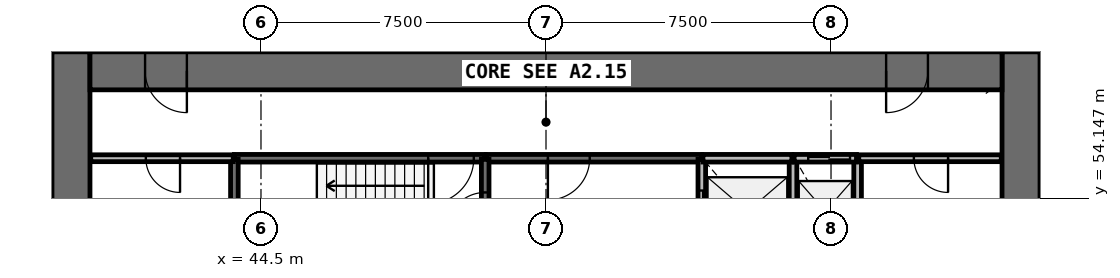
"""IFC4 building model, lengths in metres.
Left out: names, types, materials, properties, quantities, classifications, styles, units other than length and angle.
Written with IfcOpenShell. Run it as: python <this file> out.ifc"""

import sys

from ifc_helpers import new_model, si_unit, direction, frame, frame_2d, origin, place, context, subcontext, project, spatial, rectangle, extrude, source, transform, mapped, element, fill, save


model = new_model("IFC4")
c1 = context("Model", 3, precision=1e-05, world=origin(), true_north=direction((0.0, 1.0)))
c2 = subcontext(c1, "Body", "Model", "MODEL_VIEW")
j1 = project(units=[si_unit("LENGTHUNIT", "METRE"), si_unit("PLANEANGLEUNIT", "RADIAN")], contexts=[c1])
p1 = place(None, origin())
s1 = spatial("IfcSite", under=j1, at=p1, CompositionType="ELEMENT")
p2 = place(p1, origin())
s2 = spatial("IfcBuilding", under=s1, at=p2, CompositionType="ELEMENT")
p3 = place(p2, frame((0.0, 0.0, 62.2)))
s3 = spatial("IfcBuildingStorey", under=s2, at=p3, CompositionType="ELEMENT", Elevation=62.2)
p4 = place(p3, frame((64.5, 38.0, 0.0), z_axis=(0.0, 0.0, 1.0), x_axis=(0.0, 1.0, 0.0)))
e1 = element("IfcWall", 1, at=p4, inside=s3, PredefinedType="SHEAR", context=c2, shape_type="SweptSolid", body=[
    extrude(rectangle(XDim=20.0, YDim=1.0, at=frame_2d((10.0, 0.0))), origin(), (0.0, 0.0, 1.0), 4.4),
])
p5 = place(p4, frame((9.1, 0.0, 0.0)))
e2 = element("IfcOpeningElement", 2, at=p5, cuts=e1, PredefinedType="OPENING", context=c2, shape_type="SweptSolid", body=[
    extrude(rectangle(XDim=1.8, YDim=2.1, at=frame_2d((0.9, 1.05))), frame((0.0, 0.51, 0.0), z_axis=(0.0, -1.0, 0.0), x_axis=(1.0, 0.0, 0.0)), (0.0, 0.0, 1.0), 1.02),
])
p6 = place(p3, frame((39.5, 58.0, 0.0), z_axis=(0.0, 0.0, 1.0), x_axis=(0.0, -1.0, 0.0)))
e3 = element("IfcWall", 3, at=p6, inside=s3, PredefinedType="SHEAR", context=c2, shape_type="SweptSolid", body=[
    extrude(rectangle(XDim=20.0, YDim=1.0, at=frame_2d((10.0, 0.0))), origin(), (0.0, 0.0, 1.0), 4.4),
])
p7 = place(p6, frame((9.1, 0.0, 0.0)))
e4 = element("IfcOpeningElement", 4, at=p7, cuts=e3, PredefinedType="OPENING", context=c2, shape_type="SweptSolid", body=[
    extrude(rectangle(XDim=1.8, YDim=2.1, at=frame_2d((0.9, 1.05))), frame((0.0, 0.51, 0.0), z_axis=(0.0, -1.0, 0.0), x_axis=(1.0, 0.0, 0.0)), (0.0, 0.0, 1.0), 1.02),
])
p8 = place(p3, frame((64.0, 57.5, 0.0), z_axis=(0.0, 0.0, 1.0), x_axis=(-1.0, 0.0, 0.0)))
e5 = element("IfcWall", 5, at=p8, inside=s3, PredefinedType="SHEAR", context=c2, shape_type="SweptSolid", body=[
    extrude(rectangle(XDim=24.0, YDim=1.0, at=frame_2d((12.0, 0.0))), origin(), (0.0, 0.0, 1.0), 4.4),
])
p9 = place(p8, frame((21.45, 0.0, 0.0)))
e6 = element("IfcOpeningElement", 6, at=p9, cuts=e5, PredefinedType="OPENING", context=c2, shape_type="SweptSolid", body=[
    extrude(rectangle(XDim=1.1, YDim=2.1, at=frame_2d((0.55, 1.05))), frame((0.0, 0.51, 0.0), z_axis=(0.0, -1.0, 0.0), x_axis=(1.0, 0.0, 0.0)), (0.0, 0.0, 1.0), 1.02),
])
p10 = place(p8, frame((1.95, 0.0, 0.0)))
e7 = element("IfcOpeningElement", 7, at=p10, cuts=e5, PredefinedType="OPENING", context=c2, shape_type="SweptSolid", body=[
    extrude(rectangle(XDim=1.1, YDim=2.1, at=frame_2d((0.55, 1.05))), frame((0.0, 0.51, 0.0), z_axis=(0.0, -1.0, 0.0), x_axis=(1.0, 0.0, 0.0)), (0.0, 0.0, 1.0), 1.02),
])
p11 = place(p3, frame((50.4, 55.2, 0.0), z_axis=(0.0, 0.0, 1.0), x_axis=(-1.0, 0.0, 0.0)))
e8 = element("IfcWall", 8, at=p11, inside=s3, PredefinedType="SOLIDWALL", context=c2, shape_type="SweptSolid", body=[
    extrude(rectangle(XDim=6.6, YDim=0.2, at=frame_2d((3.3, 0.0))), origin(), (0.0, 0.0, 1.0), 3.95),
])
p12 = place(p11, frame((0.3, 0.0, 0.0)))
e9 = element("IfcOpeningElement", 9, at=p12, cuts=e8, PredefinedType="OPENING", context=c2, shape_type="SweptSolid", body=[
    extrude(rectangle(XDim=1.2, YDim=2.1, at=frame_2d((0.6, 1.05))), frame((0.0, 0.11, 0.0), z_axis=(0.0, -1.0, 0.0), x_axis=(1.0, 0.0, 0.0)), (0.0, 0.0, 1.0), 0.22),
])
p13 = place(p3, frame((56.1, 55.2, 0.0), z_axis=(0.0, 0.0, 1.0), x_axis=(-1.0, 0.0, 0.0)))
e10 = element("IfcWall", 10, at=p13, inside=s3, PredefinedType="SOLIDWALL", context=c2, shape_type="SweptSolid", body=[
    extrude(rectangle(XDim=5.67, YDim=0.2, at=frame_2d((2.835, 0.0))), origin(), (0.0, 0.0, 1.0), 3.95),
])
p14 = place(p13, frame((2.95, 0.0, 0.0)))
e11 = element("IfcOpeningElement", 11, at=p14, cuts=e10, PredefinedType="OPENING", context=c2, shape_type="SweptSolid", body=[
    extrude(rectangle(XDim=1.1, YDim=2.1, at=frame_2d((0.55, 1.05))), frame((0.0, 0.11, 0.0), z_axis=(0.0, -1.0, 0.0), x_axis=(1.0, 0.0, 0.0)), (0.0, 0.0, 1.0), 0.22),
])
p15 = place(p3, frame((50.4, 52.4, 0.0), z_axis=(0.0, 0.0, 1.0), x_axis=(0.0, 1.0, 0.0)))
e12 = element("IfcWall", 12, at=p15, inside=s3, PredefinedType="SOLIDWALL", context=c2, shape_type="SweptSolid", body=[
    extrude(rectangle(XDim=2.77, YDim=0.2, at=frame_2d((1.385, 0.0))), origin(), (0.0, 0.0, 1.0), 3.95),
])
p16 = place(p15, frame((0.9, 0.0, 0.0)))
e13 = element("IfcOpeningElement", 13, at=p16, cuts=e12, PredefinedType="OPENING", context=c2, shape_type="SweptSolid", body=[
    extrude(rectangle(XDim=1.0, YDim=2.1, at=frame_2d((0.5, 1.05))), frame((0.0, 0.11, 0.0), z_axis=(0.0, -1.0, 0.0), x_axis=(1.0, 0.0, 0.0)), (0.0, 0.0, 1.0), 0.22),
])
p17 = place(p3, frame((56.1, 55.17, 0.0), z_axis=(0.0, 0.0, 1.0), x_axis=(0.0, -1.0, 0.0)))
e14 = element("IfcWall", 14, at=p17, inside=s3, PredefinedType="SOLIDWALL", context=c2, shape_type="SweptSolid", body=[
    extrude(rectangle(XDim=2.77, YDim=0.2, at=frame_2d((1.385, 0.0))), origin(), (0.0, 0.0, 1.0), 3.95),
])
p18 = place(p17, frame((0.82, 0.0, 0.0)))
e15 = element("IfcOpeningElement", 15, at=p18, cuts=e14, PredefinedType="OPENING", context=c2, shape_type="SweptSolid", body=[
    extrude(rectangle(XDim=1.1, YDim=2.1, at=frame_2d((0.55, 1.05))), frame((0.0, 0.11, 0.0), z_axis=(0.0, -1.0, 0.0), x_axis=(1.0, 0.0, 0.0)), (0.0, 0.0, 1.0), 0.22),
])
for number, where, z_axis, x_axis in (
    (16, (58.5, 52.4, 0.0), (0.0, 0.0, 1.0), (0.0, 1.0, 0.0)),
    (17, (60.2, 52.4, 0.0), (0.0, 0.0, 1.0), (0.0, 1.0, 0.0)),
):
    element("IfcWall", number, at=place(p3, frame(where, z_axis=z_axis, x_axis=x_axis)), inside=s3, PredefinedType="SOLIDWALL", context=c2, shape_type="SweptSolid", body=[
        extrude(rectangle(XDim=2.8, YDim=0.2, at=frame_2d((1.4, 0.0))), origin(), (0.0, 0.0, 1.0), 3.95),
    ])
p19 = place(p3, frame((58.47, 55.2, 0.0), z_axis=(0.0, 0.0, 1.0), x_axis=(-1.0, 0.0, 0.0)))
e18 = element("IfcWall", 18, at=p19, inside=s3, PredefinedType="SOLIDWALL", context=c2, shape_type="SweptSolid", body=[
    extrude(rectangle(XDim=2.34, YDim=0.2, at=frame_2d((1.17, 0.0))), origin(), (0.0, 0.0, 1.0), 3.95),
])
p20 = place(p3, frame((43.8, 55.17, 0.0), z_axis=(0.0, 0.0, 1.0), x_axis=(0.0, -1.0, 0.0)))
e19 = element("IfcWall", 19, at=p20, inside=s3, PredefinedType="SOLIDWALL", context=c2, shape_type="SweptSolid", body=[
    extrude(rectangle(XDim=2.14, YDim=0.2, at=frame_2d((1.07, 0.0))), origin(), (0.0, 0.0, 1.0), 3.95),
])
p21 = place(p3, frame((60.17, 55.2, 0.0), z_axis=(0.0, 0.0, 1.0), x_axis=(-1.0, 0.0, 0.0)))
e20 = element("IfcWall", 20, at=p21, inside=s3, PredefinedType="SOLIDWALL", context=c2, shape_type="SweptSolid", body=[
    extrude(rectangle(XDim=1.64, YDim=0.2, at=frame_2d((0.82, 0.0))), origin(), (0.0, 0.0, 1.0), 3.95),
])
p22 = place(p21, frame((0.17, 0.0, 0.0)))
e21 = element("IfcOpeningElement", 21, at=p22, cuts=e20, PredefinedType="OPENING", context=c2, shape_type="SweptSolid", body=[
    extrude(rectangle(XDim=1.1, YDim=2.1, at=frame_2d((0.55, 1.05))), frame((0.0, 0.11, 0.0), z_axis=(0.0, -1.0, 0.0), x_axis=(1.0, 0.0, 0.0)), (0.0, 0.0, 1.0), 0.22),
])
p23 = place(p3, frame((43.77, 55.2, 0.0), z_axis=(0.0, 0.0, 1.0), x_axis=(-1.0, 0.0, 0.0)))
e22 = element("IfcWall", 22, at=p23, inside=s3, PredefinedType="PARTITIONING", context=c2, shape_type="SweptSolid", body=[
    extrude(rectangle(XDim=3.75, YDim=0.18, at=frame_2d((1.875, 0.0))), origin(), (0.0, 0.0, 1.0), 3.95),
])
p24 = place(p23, frame((1.4, 0.0, 0.0)))
e23 = element("IfcOpeningElement", 23, at=p24, cuts=e22, PredefinedType="OPENING", context=c2, shape_type="SweptSolid", body=[
    extrude(rectangle(XDim=0.9, YDim=2.1, at=frame_2d((0.45, 1.05))), frame((0.0, 0.1, 0.0), z_axis=(0.0, -1.0, 0.0), x_axis=(1.0, 0.0, 0.0)), (0.0, 0.0, 1.0), 0.2),
])
p25 = place(p3, frame((63.98, 55.2, 0.0), z_axis=(0.0, 0.0, 1.0), x_axis=(-1.0, 0.0, 0.0)))
e24 = element("IfcWall", 24, at=p25, inside=s3, PredefinedType="PARTITIONING", context=c2, shape_type="SweptSolid", body=[
    extrude(rectangle(XDim=3.75, YDim=0.18, at=frame_2d((1.875, 0.0))), origin(), (0.0, 0.0, 1.0), 3.95),
])
p26 = place(p25, frame((1.4, 0.0, 0.0)))
e25 = element("IfcOpeningElement", 25, at=p26, cuts=e24, PredefinedType="OPENING", context=c2, shape_type="SweptSolid", body=[
    extrude(rectangle(XDim=0.9, YDim=2.1, at=frame_2d((0.45, 1.05))), frame((0.0, 0.1, 0.0), z_axis=(0.0, -1.0, 0.0), x_axis=(1.0, 0.0, 0.0)), (0.0, 0.0, 1.0), 0.2),
])
m1 = source(origin(), c2, "Body", "SweptSolid", [
    extrude(rectangle(XDim=1.1, YDim=2.1, at=frame_2d((0.55, 1.05))), frame((0.0, 0.025, 0.0), z_axis=(0.0, -1.0, 0.0), x_axis=(1.0, 0.0, 0.0)), (0.0, 0.0, 1.0), 0.05),
])
p27 = place(p18, origin())
e26 = element("IfcDoor", 26, at=p27, inside=s3, OperationType="DOUBLE_DOOR_SLIDING", PredefinedType="USERDEFINED", context=c2, shape_type="MappedRepresentation", body=[
    mapped(m1, transform((0.0, 0.0, 0.0), scale=1.0)),
])
fill(e15, e26)
p28 = place(p22, origin())
e27 = element("IfcDoor", 27, at=p28, inside=s3, OperationType="DOUBLE_DOOR_SLIDING", PredefinedType="USERDEFINED", context=c2, shape_type="MappedRepresentation", body=[
    mapped(m1, transform((0.0, 0.0, 0.0), scale=1.0)),
])
fill(e21, e27)
m2 = source(origin(), c2, "Body", "SweptSolid", [
    extrude(rectangle(XDim=1.2, YDim=2.1, at=frame_2d((0.6, 1.05))), frame((0.0, 0.025, 0.0), z_axis=(0.0, -1.0, 0.0), x_axis=(1.0, 0.0, 0.0)), (0.0, 0.0, 1.0), 0.05),
])
p29 = place(p12, origin())
e28 = element("IfcDoor", 28, at=p29, inside=s3, OperationType="SINGLE_SWING_RIGHT", PredefinedType="DOOR", context=c2, shape_type="MappedRepresentation", body=[
    mapped(m2, transform((0.0, 0.0, 0.0), scale=1.0)),
])
fill(e9, e28)
m3 = source(origin(), c2, "Body", "SweptSolid", [
    extrude(rectangle(XDim=1.0, YDim=2.1, at=frame_2d((0.5, 1.05))), frame((0.0, 0.025, 0.0), z_axis=(0.0, -1.0, 0.0), x_axis=(1.0, 0.0, 0.0)), (0.0, 0.0, 1.0), 0.05),
])
p30 = place(p16, origin())
e29 = element("IfcDoor", 29, at=p30, inside=s3, OperationType="SINGLE_SWING_LEFT", PredefinedType="DOOR", context=c2, shape_type="MappedRepresentation", body=[
    mapped(m3, transform((0.0, 0.0, 0.0), scale=1.0)),
])
fill(e13, e29)
m4 = source(origin(), c2, "Body", "SweptSolid", [
    extrude(rectangle(XDim=1.1, YDim=2.1, at=frame_2d((0.55, 1.05))), frame((0.0, 0.025, 0.0), z_axis=(0.0, -1.0, 0.0), x_axis=(1.0, 0.0, 0.0)), (0.0, 0.0, 1.0), 0.05),
])
p31 = place(p14, origin())
e30 = element("IfcDoor", 30, at=p31, inside=s3, OperationType="SINGLE_SWING_RIGHT", PredefinedType="DOOR", context=c2, shape_type="MappedRepresentation", body=[
    mapped(m4, transform((0.0, 0.0, 0.0), scale=1.0)),
])
fill(e11, e30)
m5 = source(origin(), c2, "Body", "SweptSolid", [
    extrude(rectangle(XDim=1.1, YDim=2.1, at=frame_2d((0.55, 1.05))), frame((0.0, 0.025, 0.0), z_axis=(0.0, -1.0, 0.0), x_axis=(1.0, 0.0, 0.0)), (0.0, 0.0, 1.0), 0.05),
])
p32 = place(p9, origin())
e31 = element("IfcDoor", 31, at=p32, inside=s3, OperationType="SINGLE_SWING_LEFT", PredefinedType="DOOR", context=c2, shape_type="MappedRepresentation", body=[
    mapped(m5, transform((0.0, 0.0, 0.0), scale=1.0)),
])
fill(e6, e31)
p33 = place(p10, origin())
e32 = element("IfcDoor", 32, at=p33, inside=s3, OperationType="SINGLE_SWING_RIGHT", PredefinedType="DOOR", context=c2, shape_type="MappedRepresentation", body=[
    mapped(m5, transform((0.0, 0.0, 0.0), scale=1.0)),
])
fill(e7, e32)
m6 = source(origin(), c2, "Body", "SweptSolid", [
    extrude(rectangle(XDim=0.9, YDim=2.1, at=frame_2d((0.45, 1.05))), frame((0.0, 0.025, 0.0), z_axis=(0.0, -1.0, 0.0), x_axis=(1.0, 0.0, 0.0)), (0.0, 0.0, 1.0), 0.05),
])
p34 = place(p24, origin())
e33 = element("IfcDoor", 33, at=p34, inside=s3, OperationType="SINGLE_SWING_LEFT", PredefinedType="DOOR", context=c2, shape_type="MappedRepresentation", body=[
    mapped(m6, transform((0.0, 0.0, 0.0), scale=1.0)),
])
fill(e23, e33)
p35 = place(p26, origin())
e34 = element("IfcDoor", 34, at=p35, inside=s3, OperationType="SINGLE_SWING_LEFT", PredefinedType="DOOR", context=c2, shape_type="MappedRepresentation", body=[
    mapped(m6, transform((0.0, 0.0, 0.0), scale=1.0)),
])
fill(e25, e34)
save(model, sys.argv[1])
